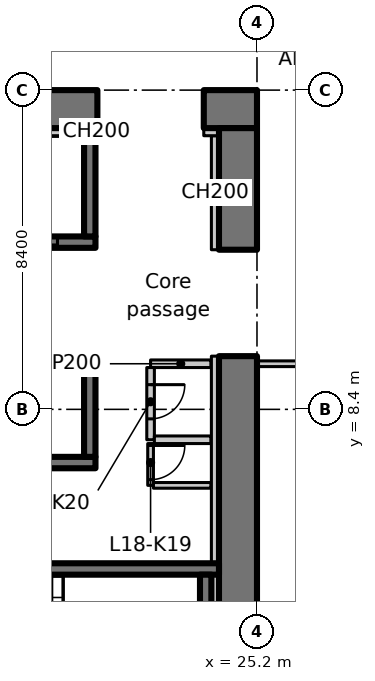
"""IFC4 building model, lengths in metres.
Left out: names, types, materials, properties, quantities, classifications, styles, units other than length and angle.
Written with IfcOpenShell. Run it as: python <this file> out.ifc"""

import sys

from ifc_helpers import new_model, si_unit, direction, frame, frame_2d, origin, place, context, subcontext, project, spatial, rectangle, extrude, element, fill, save


model = new_model("IFC4")
c1 = context("Model", 3, precision=1e-05, world=origin(), true_north=direction((0.0, 1.0)))
c2 = subcontext(c1, "Body", "Model", "MODEL_VIEW")
j1 = project(units=[si_unit("LENGTHUNIT", "METRE"), si_unit("PLANEANGLEUNIT", "RADIAN")], contexts=[c1])
p1 = place(None, origin())
s1 = spatial("IfcSite", under=j1, at=p1, CompositionType="ELEMENT")
p2 = place(p1, origin())
s2 = spatial("IfcBuilding", under=s1, at=p2, CompositionType="ELEMENT")
p3 = place(p2, frame((0.0, 0.0, 79.7)))
s3 = spatial("IfcBuildingStorey", under=s2, at=p3, CompositionType="ELEMENT", Elevation=79.7)
p4 = place(p3, frame((-1.1, 16.3, 0.0), z_axis=(0.0, 0.0, 1.0), x_axis=(1.0, 0.0, 0.0)))
e1 = element("IfcWall", 1, at=p4, inside=s3, PredefinedType="SHEAR", context=c2, shape_type="SweptSolid", body=[
    extrude(rectangle(XDim=22.1, YDim=1.0, at=frame_2d((11.05, 0.0))), origin(), (0.0, 0.0, 1.0), 3.35),
])
p5 = place(p4, frame((3.15, 0.0, 0.0)))
e2 = element("IfcOpeningElement", 2, at=p5, cuts=e1, PredefinedType="OPENING", context=c2, shape_type="SweptSolid", body=[
    extrude(rectangle(XDim=1.1, YDim=2.3, at=frame_2d((0.55, 1.15))), frame((0.0, 0.51, 0.0), z_axis=(0.0, -1.0, 0.0), x_axis=(1.0, 0.0, 0.0)), (0.0, 0.0, 1.0), 1.02),
])
p6 = place(p3, frame((23.8, 16.3, 0.0), z_axis=(0.0, 0.0, 1.0), x_axis=(1.0, 0.0, 0.0)))
e3 = element("IfcWall", 3, at=p6, inside=s3, PredefinedType="SHEAR", context=c2, shape_type="SweptSolid", body=[
    extrude(rectangle(XDim=1.4, YDim=1.0, at=frame_2d((0.7, 0.0))), origin(), (0.0, 0.0, 1.0), 3.35),
])
p7 = place(p3, frame((24.7, 1.0, 0.0), z_axis=(0.0, 0.0, 1.0), x_axis=(0.0, 1.0, 0.0)))
e4 = element("IfcWall", 4, at=p7, inside=s3, PredefinedType="SHEAR", context=c2, shape_type="SweptSolid", body=[
    extrude(rectangle(XDim=8.8, YDim=1.0, at=frame_2d((4.4, 0.0))), origin(), (0.0, 0.0, 1.0), 3.35),
])
p8 = place(p3, frame((24.7, 12.6, 0.0), z_axis=(0.0, 0.0, 1.0), x_axis=(0.0, 1.0, 0.0)))
e5 = element("IfcWall", 5, at=p8, inside=s3, PredefinedType="SHEAR", context=c2, shape_type="SweptSolid", body=[
    extrude(rectangle(XDim=3.2, YDim=1.0, at=frame_2d((1.6, 0.0))), origin(), (0.0, 0.0, 1.0), 3.35),
])
p9 = place(p3, frame((24.1, 12.6, 0.0), z_axis=(0.0, 0.0, 1.0), x_axis=(0.0, 1.0, 0.0)))
e6 = element("IfcWall", 6, at=p9, inside=s3, PredefinedType="PARTITIONING", context=c2, shape_type="SweptSolid", body=[
    extrude(rectangle(XDim=3.0, YDim=0.2, at=frame_2d((1.5, 0.0))), origin(), (0.0, 0.0, 1.0), 3.35),
])
p10 = place(p3, frame((23.8, 15.7, 0.0), z_axis=(0.0, 0.0, 1.0), x_axis=(1.0, 0.0, 0.0)))
e7 = element("IfcWall", 7, at=p10, inside=s3, PredefinedType="PARTITIONING", context=c2, shape_type="SweptSolid", body=[
    extrude(rectangle(XDim=0.4, YDim=0.2, at=frame_2d((0.2, 0.0))), origin(), (0.0, 0.0, 1.0), 3.35),
])
p11 = place(p3, frame((1.0, 7.0, 0.0), z_axis=(0.0, 0.0, 1.0), x_axis=(1.0, 0.0, 0.0)))
e8 = element("IfcWall", 8, at=p11, inside=s3, PredefinedType="SHEAR", context=c2, shape_type="SweptSolid", body=[
    extrude(rectangle(XDim=19.95, YDim=0.3, at=frame_2d((9.975, 0.0))), origin(), (0.0, 0.0, 1.0), 3.35),
])
p12 = place(p3, frame((1.0, 9.6, 0.0), z_axis=(0.0, 0.0, 1.0), x_axis=(1.0, 0.0, 0.0)))
e9 = element("IfcWall", 9, at=p12, inside=s3, PredefinedType="SHEAR", context=c2, shape_type="SweptSolid", body=[
    extrude(rectangle(XDim=19.95, YDim=0.3, at=frame_2d((9.975, 0.0))), origin(), (0.0, 0.0, 1.0), 3.35),
])
p13 = place(p12, frame((1.05, 0.0, 0.0)))
e10 = element("IfcOpeningElement", 10, at=p13, cuts=e9, PredefinedType="OPENING", context=c2, shape_type="SweptSolid", body=[
    extrude(rectangle(XDim=1.1, YDim=2.3, at=frame_2d((0.55, 1.15))), frame((0.0, 0.16, 0.0), z_axis=(0.0, -1.0, 0.0), x_axis=(1.0, 0.0, 0.0)), (0.0, 0.0, 1.0), 0.32),
])
p14 = place(p12, frame((3.85, 0.0, 0.0)))
e11 = element("IfcOpeningElement", 11, at=p14, cuts=e9, PredefinedType="OPENING", context=c2, shape_type="SweptSolid", body=[
    extrude(rectangle(XDim=1.1, YDim=2.3, at=frame_2d((0.55, 1.15))), frame((0.0, 0.16, 0.0), z_axis=(0.0, -1.0, 0.0), x_axis=(1.0, 0.0, 0.0)), (0.0, 0.0, 1.0), 0.32),
])
p15 = place(p12, frame((6.65, 0.0, 0.0)))
e12 = element("IfcOpeningElement", 12, at=p15, cuts=e9, PredefinedType="OPENING", context=c2, shape_type="SweptSolid", body=[
    extrude(rectangle(XDim=1.1, YDim=2.3, at=frame_2d((0.55, 1.15))), frame((0.0, 0.16, 0.0), z_axis=(0.0, -1.0, 0.0), x_axis=(1.0, 0.0, 0.0)), (0.0, 0.0, 1.0), 0.32),
])
p16 = place(p12, frame((9.45, 0.0, 0.0)))
e13 = element("IfcOpeningElement", 13, at=p16, cuts=e9, PredefinedType="OPENING", context=c2, shape_type="SweptSolid", body=[
    extrude(rectangle(XDim=1.1, YDim=2.3, at=frame_2d((0.55, 1.15))), frame((0.0, 0.16, 0.0), z_axis=(0.0, -1.0, 0.0), x_axis=(1.0, 0.0, 0.0)), (0.0, 0.0, 1.0), 0.32),
])
p17 = place(p12, frame((12.25, 0.0, 0.0)))
e14 = element("IfcOpeningElement", 14, at=p17, cuts=e9, PredefinedType="OPENING", context=c2, shape_type="SweptSolid", body=[
    extrude(rectangle(XDim=1.1, YDim=2.3, at=frame_2d((0.55, 1.15))), frame((0.0, 0.16, 0.0), z_axis=(0.0, -1.0, 0.0), x_axis=(1.0, 0.0, 0.0)), (0.0, 0.0, 1.0), 0.32),
])
p18 = place(p12, frame((15.05, 0.0, 0.0)))
e15 = element("IfcOpeningElement", 15, at=p18, cuts=e9, PredefinedType="OPENING", context=c2, shape_type="SweptSolid", body=[
    extrude(rectangle(XDim=1.1, YDim=2.3, at=frame_2d((0.55, 1.15))), frame((0.0, 0.16, 0.0), z_axis=(0.0, -1.0, 0.0), x_axis=(1.0, 0.0, 0.0)), (0.0, 0.0, 1.0), 0.32),
])
p19 = place(p3, frame((20.8, 7.15, 0.0), z_axis=(0.0, 0.0, 1.0), x_axis=(0.0, 1.0, 0.0)))
e16 = element("IfcWall", 16, at=p19, inside=s3, PredefinedType="SHEAR", context=c2, shape_type="SweptSolid", body=[
    extrude(rectangle(XDim=2.3, YDim=0.3, at=frame_2d((1.15, 0.0))), origin(), (0.0, 0.0, 1.0), 3.35),
])
p20 = place(p3, frame((15.05, 12.8, 0.0), z_axis=(0.0, 0.0, 1.0), x_axis=(1.0, 0.0, 0.0)))
e17 = element("IfcWall", 17, at=p20, inside=s3, PredefinedType="SHEAR", context=c2, shape_type="SweptSolid", body=[
    extrude(rectangle(XDim=5.9, YDim=0.3, at=frame_2d((2.95, 0.0))), origin(), (0.0, 0.0, 1.0), 3.35),
])
p21 = place(p20, frame((3.8, 0.0, 0.0)))
e18 = element("IfcOpeningElement", 18, at=p21, cuts=e17, PredefinedType="OPENING", context=c2, shape_type="SweptSolid", body=[
    extrude(rectangle(XDim=1.1, YDim=2.3, at=frame_2d((0.55, 1.15))), frame((0.0, 0.16, 0.0), z_axis=(0.0, -1.0, 0.0), x_axis=(1.0, 0.0, 0.0)), (0.0, 0.0, 1.0), 0.32),
])
p22 = place(p3, frame((20.8, 12.95, 0.0), z_axis=(0.0, 0.0, 1.0), x_axis=(0.0, 1.0, 0.0)))
e19 = element("IfcWall", 19, at=p22, inside=s3, PredefinedType="SHEAR", context=c2, shape_type="SweptSolid", body=[
    extrude(rectangle(XDim=2.85, YDim=0.3, at=frame_2d((1.425, 0.0))), origin(), (0.0, 0.0, 1.0), 3.35),
])
p23 = place(p3, frame((15.8, 4.2, 0.0), z_axis=(0.0, 0.0, 1.0), x_axis=(1.0, 0.0, 0.0)))
e20 = element("IfcWall", 20, at=p23, inside=s3, PredefinedType="SHEAR", context=c2, shape_type="SweptSolid", body=[
    extrude(rectangle(XDim=8.4, YDim=0.3, at=frame_2d((4.2, 0.0))), origin(), (0.0, 0.0, 1.0), 3.35),
])
p24 = place(p23, frame((0.4, 0.0, 0.0)))
e21 = element("IfcOpeningElement", 21, at=p24, cuts=e20, PredefinedType="OPENING", context=c2, shape_type="SweptSolid", body=[
    extrude(rectangle(XDim=1.0, YDim=2.1, at=frame_2d((0.5, 1.05))), frame((0.0, 0.16, 0.0), z_axis=(0.0, -1.0, 0.0), x_axis=(1.0, 0.0, 0.0)), (0.0, 0.0, 1.0), 0.32),
])
p25 = place(p3, frame((23.85, 1.5, 0.0), z_axis=(0.0, 0.0, 1.0), x_axis=(0.0, 1.0, 0.0)))
e22 = element("IfcWall", 22, at=p25, inside=s3, PredefinedType="SHEAR", context=c2, shape_type="SweptSolid", body=[
    extrude(rectangle(XDim=2.55, YDim=0.3, at=frame_2d((1.275, 0.0))), origin(), (0.0, 0.0, 1.0), 3.35),
])
p26 = place(p3, frame((23.988, 9.6, 0.0), z_axis=(0.0, 0.0, 1.0), x_axis=(-1.0, 0.0, 0.0)))
e23 = element("IfcWall", 23, at=p26, inside=s3, PredefinedType="PARTITIONING", context=c2, shape_type="SweptSolid", body=[
    extrude(rectangle(XDim=1.588, YDim=0.2, at=frame_2d((0.794, 0.0))), origin(), (0.0, 0.0, 1.0), 3.35),
])
p27 = place(p3, frame((22.4, 9.5, 0.0), z_axis=(0.0, 0.0, 1.0), x_axis=(0.0, -1.0, 0.0)))
e24 = element("IfcWall", 24, at=p27, inside=s3, PredefinedType="PARTITIONING", context=c2, shape_type="SweptSolid", body=[
    extrude(rectangle(XDim=1.9, YDim=0.2, at=frame_2d((0.95, 0.0))), origin(), (0.0, 0.0, 1.0), 3.35),
])
p28 = place(p27, frame((0.45, 0.0, 0.0)))
e25 = element("IfcOpeningElement", 25, at=p28, cuts=e24, PredefinedType="OPENING", context=c2, shape_type="SweptSolid", body=[
    extrude(rectangle(XDim=0.9, YDim=2.1, at=frame_2d((0.45, 1.05))), frame((0.0, 0.11, 0.0), z_axis=(0.0, -1.0, 0.0), x_axis=(1.0, 0.0, 0.0)), (0.0, 0.0, 1.0), 0.22),
])
p29 = place(p3, frame((22.5, 7.6, 0.0), z_axis=(0.0, 0.0, 1.0), x_axis=(1.0, 0.0, 0.0)))
e26 = element("IfcWall", 26, at=p29, inside=s3, PredefinedType="PARTITIONING", context=c2, shape_type="SweptSolid", body=[
    extrude(rectangle(XDim=1.488, YDim=0.2, at=frame_2d((0.744, 0.0))), origin(), (0.0, 0.0, 1.0), 3.35),
])
p30 = place(p3, frame((22.4, 7.5, 0.0), z_axis=(0.0, 0.0, 1.0), x_axis=(0.0, -1.0, 0.0)))
e27 = element("IfcWall", 27, at=p30, inside=s3, PredefinedType="PARTITIONING", context=c2, shape_type="SweptSolid", body=[
    extrude(rectangle(XDim=1.1, YDim=0.15, at=frame_2d((0.55, 0.0))), origin(), (0.0, 0.0, 1.0), 3.35),
])
p31 = place(p30, frame((0.05, 0.0, 0.0)))
e28 = element("IfcOpeningElement", 28, at=p31, cuts=e27, PredefinedType="OPENING", context=c2, shape_type="SweptSolid", body=[
    extrude(rectangle(XDim=0.9, YDim=2.1, at=frame_2d((0.45, 1.05))), frame((0.0, 0.085, 0.0), z_axis=(0.0, -1.0, 0.0), x_axis=(1.0, 0.0, 0.0)), (0.0, 0.0, 1.0), 0.17),
])
p32 = place(p3, frame((22.475, 6.4, 0.0), z_axis=(0.0, 0.0, 1.0), x_axis=(1.0, 0.0, 0.0)))
e29 = element("IfcWall", 29, at=p32, inside=s3, PredefinedType="PARTITIONING", context=c2, shape_type="SweptSolid", body=[
    extrude(rectangle(XDim=1.513, YDim=0.15, at=frame_2d((0.756, 0.0))), origin(), (0.0, 0.0, 1.0), 3.35),
])
p33 = place(p3, frame((18.15, 15.7, 0.0), z_axis=(0.0, 0.0, 1.0), x_axis=(1.0, 0.0, 0.0)))
e30 = element("IfcWall", 30, at=p33, inside=s3, PredefinedType="PARTITIONING", context=c2, shape_type="SweptSolid", body=[
    extrude(rectangle(XDim=2.5, YDim=0.2, at=frame_2d((1.25, 0.0))), origin(), (0.0, 0.0, 1.0), 3.35),
])
p34 = place(p3, frame((20.95, 15.7, 0.0), z_axis=(0.0, 0.0, 1.0), x_axis=(1.0, 0.0, 0.0)))
e31 = element("IfcWall", 31, at=p34, inside=s3, PredefinedType="PARTITIONING", context=c2, shape_type="SweptSolid", body=[
    extrude(rectangle(XDim=0.05, YDim=0.2, at=frame_2d((0.025, 0.0))), origin(), (0.0, 0.0, 1.0), 3.35),
])
p35 = place(p3, frame((24.1, 1.5, 0.0), z_axis=(0.0, 0.0, 1.0), x_axis=(0.0, 1.0, 0.0)))
e32 = element("IfcWall", 32, at=p35, inside=s3, PredefinedType="PARTITIONING", context=c2, shape_type="SweptSolid", body=[
    extrude(rectangle(XDim=2.55, YDim=0.2, at=frame_2d((1.275, 0.0))), origin(), (0.0, 0.0, 1.0), 3.35),
])
p36 = place(p3, frame((24.1, 4.35, 0.0), z_axis=(0.0, 0.0, 1.0), x_axis=(0.0, 1.0, 0.0)))
e33 = element("IfcWall", 33, at=p36, inside=s3, PredefinedType="PARTITIONING", context=c2, shape_type="SweptSolid", body=[
    extrude(rectangle(XDim=5.45, YDim=0.2, at=frame_2d((2.725, 0.0))), origin(), (0.0, 0.0, 1.0), 3.35),
])
p37 = place(p3, frame((29.4, 9.6, 0.0), z_axis=(0.0, 0.0, 1.0), x_axis=(-1.0, 0.0, 0.0)))
e34 = element("IfcWall", 34, at=p37, inside=s3, PredefinedType="PARTITIONING", context=c2, shape_type="SweptSolid", body=[
    extrude(rectangle(XDim=4.2, YDim=0.15, at=frame_2d((2.1, 0.0))), origin(), (0.0, 0.0, 1.0), 3.33),
])
p38 = place(p37, frame((1.5, 0.0, 0.0)))
e35 = element("IfcOpeningElement", 35, at=p38, cuts=e34, PredefinedType="OPENING", context=c2, shape_type="SweptSolid", body=[
    extrude(rectangle(XDim=1.1, YDim=2.1, at=frame_2d((0.55, 1.05))), frame((0.0, 0.085, 0.0), z_axis=(0.0, -1.0, 0.0), x_axis=(1.0, 0.0, 0.0)), (0.0, 0.0, 1.0), 0.17),
])
p39 = place(p21, origin())
e36 = element("IfcDoor", 36, at=p39, inside=s3, OperationType="SLIDING_TO_LEFT", PredefinedType="DOOR", context=c2, shape_type="SweptSolid", body=[
    extrude(rectangle(XDim=1.1, YDim=2.3, at=frame_2d((0.55, 1.15))), frame((0.0, 0.025, 0.0), z_axis=(0.0, -1.0, 0.0), x_axis=(1.0, 0.0, 0.0)), (0.0, 0.0, 1.0), 0.05),
])
fill(e18, e36)
p40 = place(p31, origin())
e37 = element("IfcDoor", 37, at=p40, inside=s3, OperationType="SINGLE_SWING_LEFT", PredefinedType="DOOR", context=c2, shape_type="SweptSolid", body=[
    extrude(rectangle(XDim=0.9, YDim=2.1, at=frame_2d((0.45, 1.05))), frame((0.0, 0.025, 0.0), z_axis=(0.0, -1.0, 0.0), x_axis=(1.0, 0.0, 0.0)), (0.0, 0.0, 1.0), 0.05),
])
fill(e28, e37)
p41 = place(p28, origin())
e38 = element("IfcDoor", 38, at=p41, inside=s3, OperationType="SINGLE_SWING_RIGHT", PredefinedType="DOOR", context=c2, shape_type="SweptSolid", body=[
    extrude(rectangle(XDim=0.9, YDim=2.1, at=frame_2d((0.45, 1.05))), frame((0.0, 0.025, 0.0), z_axis=(0.0, -1.0, 0.0), x_axis=(1.0, 0.0, 0.0)), (0.0, 0.0, 1.0), 0.05),
])
fill(e25, e38)
save(model, sys.argv[1])
